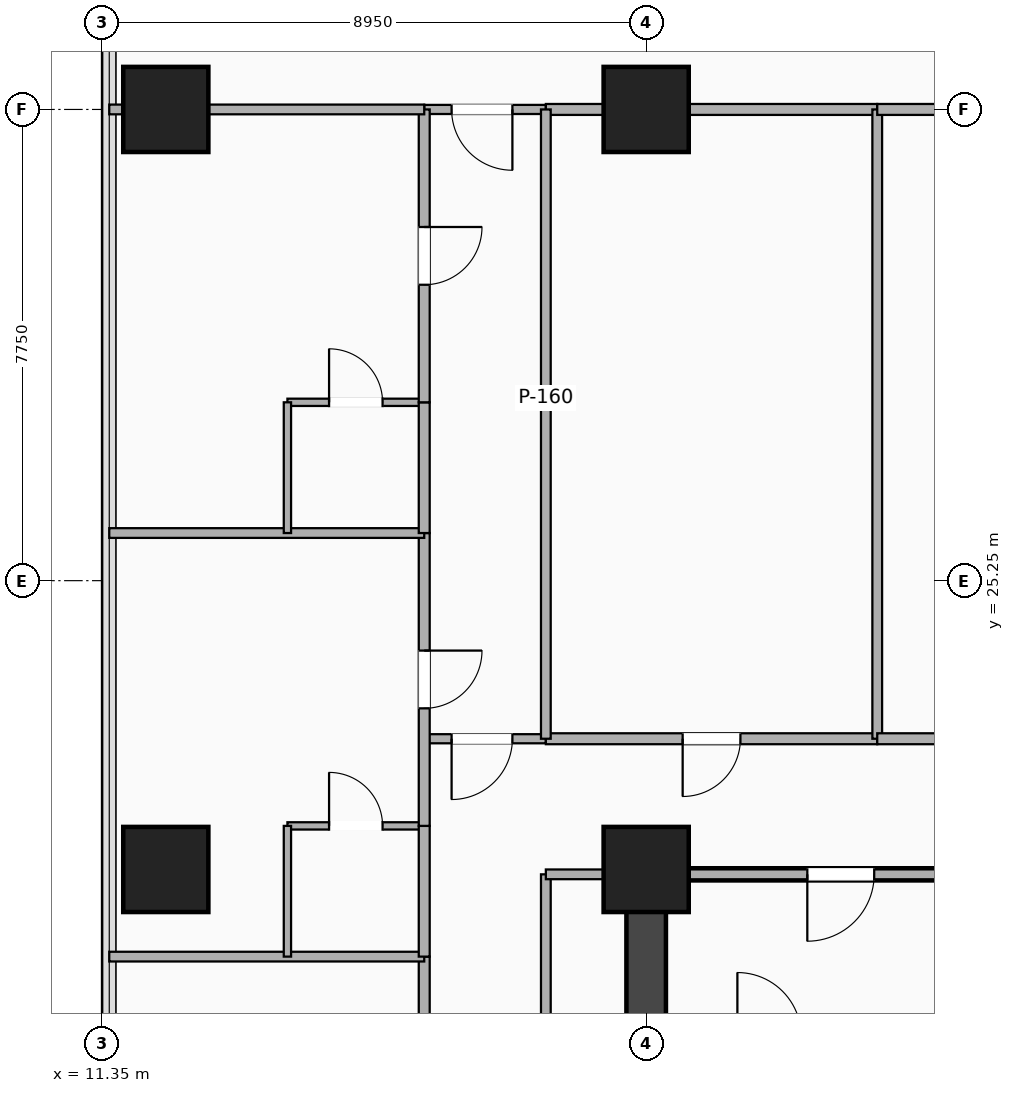
"""IFC4 building model, lengths in metres.
Left out: names, types, materials, properties, quantities, classifications, styles, units other than length and angle.
Written with IfcOpenShell. Run it as: python <this file> out.ifc"""

import sys

from ifc_helpers import new_model, si_unit, direction, frame, frame_2d, origin, origin_2d, place, context, subcontext, project, spatial, rectangle, extrude, element, fill, save


model = new_model("IFC4")
c1 = context("Model", 3, precision=1e-05, world=origin(), true_north=direction((0.0, 1.0)))
c2 = subcontext(c1, "Body", "Model", "MODEL_VIEW")
j1 = project(units=[si_unit("LENGTHUNIT", "METRE"), si_unit("PLANEANGLEUNIT", "RADIAN")], contexts=[c1])
p1 = place(None, origin())
s1 = spatial("IfcSite", under=j1, at=p1, CompositionType="ELEMENT")
p2 = place(p1, origin())
s2 = spatial("IfcBuilding", under=s1, at=p2, CompositionType="ELEMENT")
p3 = place(p2, frame((0.0, 0.0, 68.4)))
s3 = spatial("IfcBuildingStorey", under=s2, at=p3, CompositionType="ELEMENT", Elevation=68.4)
p4 = place(p3, frame((20.3, 3.5, 0.0), z_axis=(0.0, 0.0, 1.0), x_axis=(0.0, 1.0, 0.0)))
e1 = element("IfcWall", 1, at=p4, inside=s3, PredefinedType="SHEAR", context=c2, shape_type="SweptSolid", body=[
    extrude(rectangle(XDim=16.9, YDim=0.65, at=frame_2d((8.45, 0.0))), origin(), (0.0, 0.0, 1.0), 3.22),
])
for number, where, z_axis, x_axis in (
    (2, (20.3, 20.5, -0.28), (0.0, 0.0, 1.0), (1.0, 0.0, 0.0)),
    (3, (20.3, 33.0, -0.28), (0.0, 0.0, 1.0), (1.0, 0.0, 0.0)),
    (4, (12.4, 20.5, -0.28), (0.0, 0.0, 1.0), (1.0, 0.0, 0.0)),
    (5, (12.4, 33.0, -0.28), (0.0, 0.0, 1.0), (1.0, 0.0, 0.0)),
):
    element("IfcColumn", number, at=place(p3, frame(where, z_axis=z_axis, x_axis=x_axis)), inside=s3, PredefinedType="COLUMN", context=c2, shape_type="SweptSolid", body=[
        extrude(rectangle(XDim=1.4, YDim=1.4, at=origin_2d()), origin(), (0.0, 0.0, 1.0), 3.5),
    ])
p5 = place(p3, frame((20.65, 20.42, 0.0), z_axis=(0.0, 0.0, 1.0), x_axis=(1.0, 0.0, 0.0)))
e6 = element("IfcWall", 6, at=p5, inside=s3, PredefinedType="PARTITIONING", context=c2, shape_type="SweptSolid", body=[
    extrude(rectangle(XDim=5.73, YDim=0.2, at=frame_2d((2.865, 0.0))), origin(), (0.0, 0.0, 1.0), 2.51),
])
p6 = place(p5, frame((2.3, 0.0, 0.0)))
e7 = element("IfcOpeningElement", 7, at=p6, cuts=e6, PredefinedType="OPENING", context=c2, shape_type="SweptSolid", body=[
    extrude(rectangle(XDim=1.1, YDim=2.15, at=frame_2d((0.55, 1.075))), frame((0.0, 0.11, 0.0), z_axis=(0.0, -1.0, 0.0), x_axis=(1.0, 0.0, 0.0)), (0.0, 0.0, 1.0), 0.22),
])
p7 = place(p3, frame((18.65, 12.1, 0.0), z_axis=(0.0, 0.0, 1.0), x_axis=(0.0, 1.0, 0.0)))
e8 = element("IfcWall", 8, at=p7, inside=s3, PredefinedType="PARTITIONING", context=c2, shape_type="SweptSolid", body=[
    extrude(rectangle(XDim=8.32, YDim=0.16, at=frame_2d((4.16, 0.0))), origin(), (0.0, 0.0, 1.0), 2.51),
])
p8 = place(p7, frame((1.28, 0.0, 0.0), z_axis=(0.0, 0.0, 1.0), x_axis=(-1.0, 0.0, 0.0)))
e9 = element("IfcOpeningElement", 9, at=p8, cuts=e8, PredefinedType="OPENING", context=c2, shape_type="SweptSolid", body=[
    extrude(rectangle(XDim=0.88, YDim=2.08, at=frame_2d((0.44, 1.04))), frame((0.0, 0.09, 0.0), z_axis=(0.0, -1.0, 0.0), x_axis=(1.0, 0.0, 0.0)), (0.0, 0.0, 1.0), 0.18),
])
p9 = place(p3, frame((18.65, 20.42, 0.0), z_axis=(0.0, 0.0, 1.0), x_axis=(1.0, 0.0, 0.0)))
e10 = element("IfcWall", 10, at=p9, inside=s3, PredefinedType="PARTITIONING", context=c2, shape_type="SweptSolid", body=[
    extrude(rectangle(XDim=1.65, YDim=0.16, at=frame_2d((0.825, 0.0))), origin(), (0.0, 0.0, 1.0), 2.51),
])
p10 = place(p3, frame((16.65, 22.65, 0.0), z_axis=(0.0, 0.0, 1.0), x_axis=(1.0, 0.0, 0.0)))
e11 = element("IfcWall", 11, at=p10, inside=s3, PredefinedType="PARTITIONING", context=c2, shape_type="SweptSolid", body=[
    extrude(rectangle(XDim=2.0, YDim=0.15, at=frame_2d((1.0, 0.0))), origin(), (0.0, 0.0, 1.0), 3.22),
])
p11 = place(p10, frame((0.45, 0.0, 0.0)))
e12 = element("IfcOpeningElement", 12, at=p11, cuts=e11, PredefinedType="OPENING", context=c2, shape_type="SweptSolid", body=[
    extrude(rectangle(XDim=1.0, YDim=2.15, at=frame_2d((0.5, 1.075))), frame((0.0, 0.085, 0.0), z_axis=(0.0, -1.0, 0.0), x_axis=(1.0, 0.0, 0.0)), (0.0, 0.0, 1.0), 0.17),
])
p12 = place(p3, frame((16.65, 33.0, 0.0), z_axis=(0.0, 0.0, 1.0), x_axis=(1.0, 0.0, 0.0)))
e13 = element("IfcWall", 13, at=p12, inside=s3, PredefinedType="PARTITIONING", context=c2, shape_type="SweptSolid", body=[
    extrude(rectangle(XDim=2.0, YDim=0.15, at=frame_2d((1.0, 0.0))), origin(), (0.0, 0.0, 1.0), 2.51),
])
p13 = place(p12, frame((0.45, 0.0, 0.0)))
e14 = element("IfcOpeningElement", 14, at=p13, cuts=e13, PredefinedType="OPENING", context=c2, shape_type="SweptSolid", body=[
    extrude(rectangle(XDim=1.0, YDim=2.15, at=frame_2d((0.5, 1.075))), frame((0.0, 0.085, 0.0), z_axis=(0.0, -1.0, 0.0), x_axis=(1.0, 0.0, 0.0)), (0.0, 0.0, 1.0), 0.17),
])
p14 = place(p3, frame((18.65, 22.65, 0.0), z_axis=(0.0, 0.0, 1.0), x_axis=(1.0, 0.0, 0.0)))
e15 = element("IfcWall", 15, at=p14, inside=s3, PredefinedType="PARTITIONING", context=c2, shape_type="SweptSolid", body=[
    extrude(rectangle(XDim=5.45, YDim=0.18, at=frame_2d((2.725, 0.0))), origin(), (0.0, 0.0, 1.0), 2.51),
])
p15 = place(p14, frame((2.25, 0.0, 0.0)))
e16 = element("IfcOpeningElement", 16, at=p15, cuts=e15, PredefinedType="OPENING", context=c2, shape_type="SweptSolid", body=[
    extrude(rectangle(XDim=0.95, YDim=2.15, at=frame_2d((0.475, 1.075))), frame((0.0, 0.1, 0.0), z_axis=(0.0, -1.0, 0.0), x_axis=(1.0, 0.0, 0.0)), (0.0, 0.0, 1.0), 0.2),
])
p16 = place(p3, frame((18.65, 33.0, 0.0), z_axis=(0.0, 0.0, 1.0), x_axis=(1.0, 0.0, 0.0)))
e17 = element("IfcWall", 17, at=p16, inside=s3, PredefinedType="PARTITIONING", context=c2, shape_type="SweptSolid", body=[
    extrude(rectangle(XDim=5.45, YDim=0.18, at=frame_2d((2.725, 0.0))), origin(), (0.0, 0.0, 1.0), 2.51),
])
for number, where, z_axis, x_axis in (
    (18, (18.65, 22.65, 0.0), (0.0, 0.0, 1.0), (0.0, 1.0, 0.0)),
    (19, (24.1, 22.65, 0.0), (0.0, 0.0, 1.0), (0.0, 1.0, 0.0)),
):
    element("IfcWall", number, at=place(p3, frame(where, z_axis=z_axis, x_axis=x_axis)), inside=s3, PredefinedType="PARTITIONING", context=c2, shape_type="SweptSolid", body=[
        extrude(rectangle(XDim=10.35, YDim=0.16, at=frame_2d((5.175, 0.0))), origin(), (0.0, 0.0, 1.0), 2.51),
    ])
p17 = place(p3, frame((24.1, 22.65, 0.0), z_axis=(0.0, 0.0, 1.0), x_axis=(1.0, 0.0, 0.0)))
e20 = element("IfcWall", 20, at=p17, inside=s3, PredefinedType="PARTITIONING", context=c2, shape_type="SweptSolid", body=[
    extrude(rectangle(XDim=22.35, YDim=0.18, at=frame_2d((11.175, 0.0))), origin(), (0.0, 0.0, 1.0), 2.51),
])
p18 = place(p17, frame((10.7, 0.0, 0.0)))
e21 = element("IfcOpeningElement", 21, at=p18, cuts=e20, PredefinedType="OPENING", context=c2, shape_type="SweptSolid", body=[
    extrude(rectangle(XDim=0.95, YDim=2.15, at=frame_2d((0.475, 1.075))), frame((0.0, 0.1, 0.0), z_axis=(0.0, -1.0, 0.0), x_axis=(1.0, 0.0, 0.0)), (0.0, 0.0, 1.0), 0.2),
])
p19 = place(p3, frame((24.1, 33.0, 0.0), z_axis=(0.0, 0.0, 1.0), x_axis=(1.0, 0.0, 0.0)))
e22 = element("IfcWall", 22, at=p19, inside=s3, PredefinedType="PARTITIONING", context=c2, shape_type="SweptSolid", body=[
    extrude(rectangle(XDim=22.35, YDim=0.18, at=frame_2d((11.175, 0.0))), origin(), (0.0, 0.0, 1.0), 2.51),
])
p20 = place(p3, frame((16.65, 14.25, 0.0), z_axis=(0.0, 0.0, 1.0), x_axis=(0.0, 1.0, 0.0)))
e23 = element("IfcWall", 23, at=p20, inside=s3, PredefinedType="PARTITIONING", context=c2, shape_type="SweptSolid", body=[
    extrude(rectangle(XDim=4.817, YDim=0.18, at=frame_2d((2.408, 0.0))), origin(), (0.0, 0.0, 1.0), 2.902),
])
p21 = place(p20, frame((1.933, 0.0, 0.0)))
e24 = element("IfcOpeningElement", 24, at=p21, cuts=e23, PredefinedType="OPENING", context=c2, shape_type="SweptSolid", body=[
    extrude(rectangle(XDim=0.95, YDim=2.15, at=frame_2d((0.475, 1.075))), frame((0.0, 0.1, 0.0), z_axis=(0.0, -1.0, 0.0), x_axis=(1.0, 0.0, 0.0)), (0.0, 0.0, 1.0), 0.2),
])
p22 = place(p3, frame((11.47, 19.067, 0.0), z_axis=(0.0, 0.0, 1.0), x_axis=(1.0, 0.0, 0.0)))
e25 = element("IfcWall", 25, at=p22, inside=s3, PredefinedType="PARTITIONING", context=c2, shape_type="SweptSolid", body=[
    extrude(rectangle(XDim=5.18, YDim=0.16, at=frame_2d((2.59, 0.0))), origin(), (0.0, 0.0, 1.0), 2.583),
])
p23 = place(p3, frame((14.4, 21.217, 0.0), z_axis=(0.0, 0.0, 1.0), x_axis=(1.0, 0.0, 0.0)))
e26 = element("IfcWall", 26, at=p23, inside=s3, PredefinedType="PARTITIONING", context=c2, shape_type="SweptSolid", body=[
    extrude(rectangle(XDim=2.25, YDim=0.12, at=frame_2d((1.125, 0.0))), origin(), (0.0, 0.0, 1.0), 3.22),
])
p24 = place(p23, frame((1.565, 0.0, 0.0), z_axis=(0.0, 0.0, 1.0), x_axis=(-1.0, 0.0, 0.0)))
e27 = element("IfcOpeningElement", 27, at=p24, cuts=e26, PredefinedType="OPENING", context=c2, shape_type="SweptSolid", body=[
    extrude(rectangle(XDim=0.88, YDim=2.08, at=frame_2d((0.44, 1.04))), frame((0.0, 0.07, 0.0), z_axis=(0.0, -1.0, 0.0), x_axis=(1.0, 0.0, 0.0)), (0.0, 0.0, 1.0), 0.14),
])
p25 = place(p3, frame((14.4, 19.067, 0.0), z_axis=(0.0, 0.0, 1.0), x_axis=(0.0, 1.0, 0.0)))
e28 = element("IfcWall", 28, at=p25, inside=s3, PredefinedType="PARTITIONING", context=c2, shape_type="SweptSolid", body=[
    extrude(rectangle(XDim=2.15, YDim=0.12, at=frame_2d((1.075, 0.0))), origin(), (0.0, 0.0, 1.0), 2.51),
])
p26 = place(p3, frame((16.65, 19.067, 0.0), z_axis=(0.0, 0.0, 1.0), x_axis=(0.0, 1.0, 0.0)))
e29 = element("IfcWall", 29, at=p26, inside=s3, PredefinedType="PARTITIONING", context=c2, shape_type="SweptSolid", body=[
    extrude(rectangle(XDim=2.15, YDim=0.18, at=frame_2d((1.075, 0.0))), origin(), (0.0, 0.0, 1.0), 2.51),
])
p27 = place(p3, frame((16.65, 21.217, 0.0), z_axis=(0.0, 0.0, 1.0), x_axis=(0.0, 1.0, 0.0)))
e30 = element("IfcWall", 30, at=p27, inside=s3, PredefinedType="PARTITIONING", context=c2, shape_type="SweptSolid", body=[
    extrude(rectangle(XDim=4.816, YDim=0.18, at=frame_2d((2.408, 0.0))), origin(), (0.0, 0.0, 1.0), 2.788),
])
p28 = place(p27, frame((1.933, 0.0, 0.0)))
e31 = element("IfcOpeningElement", 31, at=p28, cuts=e30, PredefinedType="OPENING", context=c2, shape_type="SweptSolid", body=[
    extrude(rectangle(XDim=0.95, YDim=2.15, at=frame_2d((0.475, 1.075))), frame((0.0, 0.1, 0.0), z_axis=(0.0, -1.0, 0.0), x_axis=(1.0, 0.0, 0.0)), (0.0, 0.0, 1.0), 0.2),
])
p29 = place(p3, frame((11.47, 26.033, 0.0), z_axis=(0.0, 0.0, 1.0), x_axis=(1.0, 0.0, 0.0)))
e32 = element("IfcWall", 32, at=p29, inside=s3, PredefinedType="PARTITIONING", context=c2, shape_type="SweptSolid", body=[
    extrude(rectangle(XDim=5.18, YDim=0.16, at=frame_2d((2.59, 0.0))), origin(), (0.0, 0.0, 1.0), 2.583),
])
p30 = place(p3, frame((14.4, 28.183, 0.0), z_axis=(0.0, 0.0, 1.0), x_axis=(1.0, 0.0, 0.0)))
e33 = element("IfcWall", 33, at=p30, inside=s3, PredefinedType="PARTITIONING", context=c2, shape_type="SweptSolid", body=[
    extrude(rectangle(XDim=2.25, YDim=0.12, at=frame_2d((1.125, 0.0))), origin(), (0.0, 0.0, 1.0), 3.22),
])
p31 = place(p30, frame((1.565, 0.0, 0.0), z_axis=(0.0, 0.0, 1.0), x_axis=(-1.0, 0.0, 0.0)))
e34 = element("IfcOpeningElement", 34, at=p31, cuts=e33, PredefinedType="OPENING", context=c2, shape_type="SweptSolid", body=[
    extrude(rectangle(XDim=0.88, YDim=2.08, at=frame_2d((0.44, 1.04))), frame((0.0, 0.07, 0.0), z_axis=(0.0, -1.0, 0.0), x_axis=(1.0, 0.0, 0.0)), (0.0, 0.0, 1.0), 0.14),
])
p32 = place(p3, frame((14.4, 26.033, 0.0), z_axis=(0.0, 0.0, 1.0), x_axis=(0.0, 1.0, 0.0)))
e35 = element("IfcWall", 35, at=p32, inside=s3, PredefinedType="PARTITIONING", context=c2, shape_type="SweptSolid", body=[
    extrude(rectangle(XDim=2.15, YDim=0.12, at=frame_2d((1.075, 0.0))), origin(), (0.0, 0.0, 1.0), 3.22),
])
p33 = place(p3, frame((16.65, 26.033, 0.0), z_axis=(0.0, 0.0, 1.0), x_axis=(0.0, 1.0, 0.0)))
e36 = element("IfcWall", 36, at=p33, inside=s3, PredefinedType="PARTITIONING", context=c2, shape_type="SweptSolid", body=[
    extrude(rectangle(XDim=2.15, YDim=0.18, at=frame_2d((1.075, 0.0))), origin(), (0.0, 0.0, 1.0), 3.22),
])
p34 = place(p3, frame((16.65, 28.183, 0.0), z_axis=(0.0, 0.0, 1.0), x_axis=(0.0, 1.0, 0.0)))
e37 = element("IfcWall", 37, at=p34, inside=s3, PredefinedType="PARTITIONING", context=c2, shape_type="SweptSolid", body=[
    extrude(rectangle(XDim=4.817, YDim=0.18, at=frame_2d((2.408, 0.0))), origin(), (0.0, 0.0, 1.0), 2.51),
])
p35 = place(p34, frame((1.933, 0.0, 0.0)))
e38 = element("IfcOpeningElement", 38, at=p35, cuts=e37, PredefinedType="OPENING", context=c2, shape_type="SweptSolid", body=[
    extrude(rectangle(XDim=0.95, YDim=2.15, at=frame_2d((0.475, 1.075))), frame((0.0, 0.1, 0.0), z_axis=(0.0, -1.0, 0.0), x_axis=(1.0, 0.0, 0.0)), (0.0, 0.0, 1.0), 0.2),
])
p36 = place(p3, frame((11.47, 33.0, 0.0), z_axis=(0.0, 0.0, 1.0), x_axis=(1.0, 0.0, 0.0)))
e39 = element("IfcWall", 39, at=p36, inside=s3, PredefinedType="PARTITIONING", context=c2, shape_type="SweptSolid", body=[
    extrude(rectangle(XDim=5.18, YDim=0.16, at=frame_2d((2.59, 0.0))), origin(), (0.0, 0.0, 1.0), 2.51),
])
p37 = place(p6, origin())
e40 = element("IfcDoor", 40, at=p37, inside=s3, OperationType="SINGLE_SWING_LEFT", PredefinedType="DOOR", context=c2, shape_type="SweptSolid", body=[
    extrude(rectangle(XDim=1.1, YDim=2.15, at=frame_2d((0.55, 1.075))), frame((0.0, 0.025, 0.0), z_axis=(0.0, -1.0, 0.0), x_axis=(1.0, 0.0, 0.0)), (0.0, 0.0, 1.0), 0.05),
])
fill(e7, e40)
p38 = place(p11, origin())
e41 = element("IfcDoor", 41, at=p38, inside=s3, OperationType="SINGLE_SWING_LEFT", PredefinedType="DOOR", context=c2, shape_type="SweptSolid", body=[
    extrude(rectangle(XDim=1.0, YDim=2.15, at=frame_2d((0.5, 1.075))), frame((0.0, 0.025, 0.0), z_axis=(0.0, -1.0, 0.0), x_axis=(1.0, 0.0, 0.0)), (0.0, 0.0, 1.0), 0.05),
])
fill(e12, e41)
p39 = place(p13, origin())
e42 = element("IfcDoor", 42, at=p39, inside=s3, OperationType="SINGLE_SWING_RIGHT", PredefinedType="DOOR", context=c2, shape_type="SweptSolid", body=[
    extrude(rectangle(XDim=1.0, YDim=2.15, at=frame_2d((0.5, 1.075))), frame((0.0, 0.025, 0.0), z_axis=(0.0, -1.0, 0.0), x_axis=(1.0, 0.0, 0.0)), (0.0, 0.0, 1.0), 0.05),
])
fill(e14, e42)
p40 = place(p15, origin())
e43 = element("IfcDoor", 43, at=p40, inside=s3, OperationType="SINGLE_SWING_LEFT", PredefinedType="DOOR", context=c2, shape_type="SweptSolid", body=[
    extrude(rectangle(XDim=0.95, YDim=2.15, at=frame_2d((0.475, 1.075))), frame((0.0, 0.025, 0.0), z_axis=(0.0, -1.0, 0.0), x_axis=(1.0, 0.0, 0.0)), (0.0, 0.0, 1.0), 0.05),
])
fill(e16, e43)
p41 = place(p24, origin())
e44 = element("IfcDoor", 44, at=p41, inside=s3, OperationType="SINGLE_SWING_LEFT", PredefinedType="DOOR", context=c2, shape_type="SweptSolid", body=[
    extrude(rectangle(XDim=0.88, YDim=2.08, at=frame_2d((0.44, 1.04))), frame((0.0, 0.025, 0.0), z_axis=(0.0, -1.0, 0.0), x_axis=(1.0, 0.0, 0.0)), (0.0, 0.0, 1.0), 0.05),
])
fill(e27, e44)
p42 = place(p28, origin())
e45 = element("IfcDoor", 45, at=p42, inside=s3, OperationType="SINGLE_SWING_RIGHT", PredefinedType="DOOR", context=c2, shape_type="SweptSolid", body=[
    extrude(rectangle(XDim=0.95, YDim=2.15, at=frame_2d((0.475, 1.075))), frame((0.0, 0.025, 0.0), z_axis=(0.0, -1.0, 0.0), x_axis=(1.0, 0.0, 0.0)), (0.0, 0.0, 1.0), 0.05),
])
fill(e31, e45)
p43 = place(p31, origin())
e46 = element("IfcDoor", 46, at=p43, inside=s3, OperationType="SINGLE_SWING_LEFT", PredefinedType="DOOR", context=c2, shape_type="SweptSolid", body=[
    extrude(rectangle(XDim=0.88, YDim=2.08, at=frame_2d((0.44, 1.04))), frame((0.0, 0.025, 0.0), z_axis=(0.0, -1.0, 0.0), x_axis=(1.0, 0.0, 0.0)), (0.0, 0.0, 1.0), 0.05),
])
fill(e34, e46)
p44 = place(p35, origin())
e47 = element("IfcDoor", 47, at=p44, inside=s3, OperationType="SINGLE_SWING_RIGHT", PredefinedType="DOOR", context=c2, shape_type="SweptSolid", body=[
    extrude(rectangle(XDim=0.95, YDim=2.15, at=frame_2d((0.475, 1.075))), frame((0.0, 0.025, 0.0), z_axis=(0.0, -1.0, 0.0), x_axis=(1.0, 0.0, 0.0)), (0.0, 0.0, 1.0), 0.05),
])
fill(e38, e47)
save(model, sys.argv[1])
